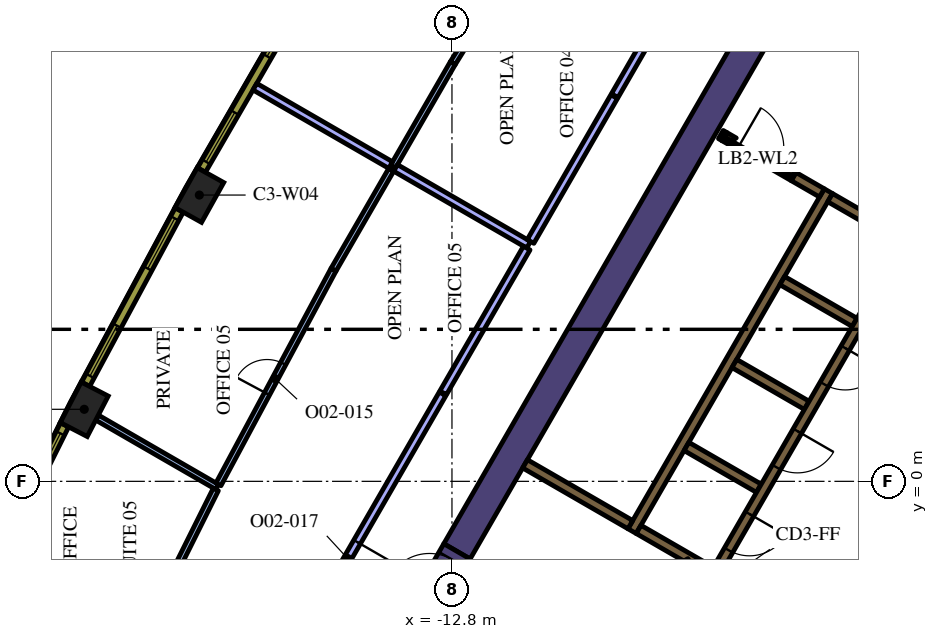
"""IFC4 building model, lengths in metres.
Left out: names, types, materials, properties, quantities, classifications, styles, units other than length and angle.
Written with IfcOpenShell. Run it as: python <this file> out.ifc"""

import sys

from ifc_helpers import new_model, si_unit, direction, frame, frame_2d, origin, origin_2d, place, context, subcontext, project, spatial, polyline, rectangle, outline, extrude, element, fill, save


model = new_model("IFC4")
c1 = context("Model", 3, precision=1e-05, world=origin(), true_north=direction((0.0, 1.0)))
c2 = subcontext(c1, "Body", "Model", "MODEL_VIEW")
j1 = project(units=[si_unit("LENGTHUNIT", "METRE"), si_unit("PLANEANGLEUNIT", "RADIAN")], contexts=[c1])
p1 = place(None, origin())
s1 = spatial("IfcSite", under=j1, at=p1, CompositionType="ELEMENT")
p2 = place(p1, origin())
s2 = spatial("IfcBuilding", under=s1, at=p2, CompositionType="ELEMENT")
p3 = place(p2, frame((0.0, 0.0, 154.2)))
s3 = spatial("IfcBuildingStorey", under=s2, at=p3, CompositionType="ELEMENT", Elevation=154.2)
for number, where, z_axis, x_axis in (
    (1, (-19.447, 7.533, 0.0), (0.0, 0.0, 1.0), (-0.487, -0.874, 0.0)),
    (2, (-22.476, 1.896, 0.0), (0.0, 0.0, 1.0), (-0.46, -0.888, 0.0)),
):
    element("IfcColumn", number, at=place(p3, frame(where, z_axis=z_axis, x_axis=x_axis)), inside=s3, PredefinedType="COLUMN", context=c2, shape_type="SweptSolid", body=[
        extrude(rectangle(XDim=1.2, YDim=0.8, at=origin_2d()), origin(), (0.0, 0.0, 1.0), 4.2),
    ])
p4 = place(p3, frame((-12.668, -1.842, 0.0), z_axis=(0.0, 0.0, 1.0), x_axis=(0.500003640647, 0.866023301845, 0.0)))
e3 = element("IfcWall", 3, at=p4, inside=s3, PredefinedType="SOLIDWALL", context=c2, shape_type="SweptSolid", body=[
    extrude(rectangle(XDim=15.858, YDim=0.8, at=frame_2d((7.929, 0.0))), origin(), (0.0, 0.0, 1.0), 4.2),
])
p5 = place(p3, frame((-8.06, -1.311, 0.0), z_axis=(0.0, 0.0, 1.0), x_axis=(0.50000273126, 0.866023826885, 0.0)))
e4 = element("IfcWall", 4, at=p5, inside=s3, PredefinedType="SOLIDWALL", context=c2, shape_type="SweptSolid", body=[
    extrude(rectangle(XDim=10.33, YDim=0.25, at=frame_2d((5.165, 0.0))), origin(), (0.0, 0.0, 1.0), 4.2),
])
p6 = place(p3, frame((-1.76, 6.836, 0.0), z_axis=(0.0, 0.0, 1.0), x_axis=(-0.865952863304, 0.500125622755, 0.0)))
e5 = element("IfcWall", 5, at=p6, inside=s3, PredefinedType="SOLIDWALL", context=c2, shape_type="SweptSolid", body=[
    extrude(rectangle(XDim=1.258, YDim=0.25, at=frame_2d((0.629, 0.0))), origin(), (0.0, 0.0, 1.0), 4.2),
])
for number, where, z_axis, x_axis in (
    (6, (-2.204, 4.182, 0.0), (0.0, 0.0, 1.0), (-0.866, 0.5, 0.0)),
    (7, (-5.369, 3.1, 0.0), (0.0, 0.0, 1.0), (0.866, -0.5, 0.0)),
    (8, (-4.724, -0.182, 0.0), (0.0, 0.0, 1.0), (-0.866, 0.5, 0.0)),
):
    element("IfcWall", number, at=place(p3, frame(where, z_axis=z_axis, x_axis=x_axis)), inside=s3, PredefinedType="SOLIDWALL", context=c2, shape_type="SweptSolid", body=[
        extrude(rectangle(XDim=2.2, YDim=0.25, at=frame_2d((1.1, 0.0))), origin(), (0.0, 0.0, 1.0), 4.2),
    ])
p7 = place(p3, origin())
e9 = element("IfcWall", 9, at=p7, inside=s3, PredefinedType="SOLIDWALL", context=c2, shape_type="SweptSolid", body=[
    extrude(outline(polyline([(-5.922, -2.257), (-5.922, -2.257), (-5.705, -2.382), (-5.83, -2.598), (-6.483, -2.221), (-6.591, -2.033), (-6.591, -2.033), (-6.7, -2.096), (-7.952, -1.373), (-7.827, -1.156), (-5.922, -2.257)])), origin(), (0.0, 0.0, 1.0), 4.2),
])
p8 = place(p3, frame((-8.106, -1.14, 0.0), z_axis=(0.0, 0.0, 1.0), x_axis=(-0.866008981251, 0.500028443584, 0.0)))
e10 = element("IfcWall", 10, at=p8, inside=s3, PredefinedType="SOLIDWALL", context=c2, shape_type="SweptSolid", body=[
    extrude(rectangle(XDim=3.2, YDim=0.25, at=frame_2d((1.6, 0.0))), origin(), (0.0, 0.0, 1.0), 4.2),
])
p9 = place(p3, frame((-5.725, 9.125, 0.0), z_axis=(0.0, 0.0, 1.0), x_axis=(0.866185586049, -0.49972245349, 0.0)))
e11 = element("IfcWall", 11, at=p9, inside=s3, PredefinedType="SOLIDWALL", context=c2, shape_type="SweptSolid", body=[
    extrude(rectangle(XDim=0.11, YDim=0.25, at=frame_2d((0.055, 0.0))), origin(), (0.0, 0.0, 1.0), 4.2),
])
p10 = place(p3, frame((-3.066, 7.59, 0.0), z_axis=(0.0, 0.0, 1.0), x_axis=(-0.866081358704, 0.49990307071, 0.0)))
e12 = element("IfcWall", 12, at=p10, inside=s3, PredefinedType="SOLIDWALL", context=c2, shape_type="SweptSolid", body=[
    extrude(rectangle(XDim=0.858, YDim=0.25, at=frame_2d((0.429, 0.0))), origin(), (0.0, 0.0, 1.0), 4.2),
])
e13 = element("IfcWall", 13, at=p7, inside=s3, PredefinedType="SOLIDWALL", context=c2, shape_type="SweptSolid", body=[
    extrude(outline(polyline([(-3.748, 8.128), (-3.813, 8.015), (-4.027, 8.139), (-4.017, 8.156), (-4.008, 8.173), (-4.0, 8.192), (-3.995, 8.21), (-3.991, 8.23), (-3.99, 8.25), (-3.99, 8.268), (-3.748, 8.128)])), origin(), (0.0, 0.0, 1.0), 4.2),
])
e14 = element("IfcWall", 14, at=p7, inside=s3, PredefinedType="SOLIDWALL", context=c2, shape_type="SweptSolid", body=[
    extrude(outline(polyline([(-5.689, 8.96), (-5.69, 8.961), (-5.565, 9.177), (-5.319, 9.035), (-5.335, 9.026), (-5.351, 9.015), (-5.366, 9.002), (-5.379, 8.988), (-5.392, 8.972), (-5.402, 8.956), (-5.412, 8.939), (-5.629, 9.064), (-5.629, 9.064), (-5.689, 8.96)])), origin(), (0.0, 0.0, 1.0), 4.2),
])
p11 = place(p3, frame((-0.898, 6.194, 0.0), z_axis=(0.0, 0.0, 1.0), x_axis=(-0.499996202215, -0.866027596426, 0.0)))
e15 = element("IfcWall", 15, at=p11, inside=s3, PredefinedType="SOLIDWALL", context=c2, shape_type="SweptSolid", body=[
    extrude(rectangle(XDim=9.83, YDim=0.25, at=frame_2d((4.915, 0.0))), origin(), (0.0, 0.0, 1.0), 4.2),
])
p12 = place(p11, frame((0.585, 0.0, 0.0)))
e16 = element("IfcOpeningElement", 16, at=p12, cuts=e15, PredefinedType="OPENING", context=c2, shape_type="SweptSolid", body=[
    extrude(rectangle(XDim=1.1, YDim=2.1, at=frame_2d((0.55, 1.05))), frame((0.0, 0.135, 0.0), z_axis=(0.0, -1.0, 0.0), x_axis=(1.0, 0.0, 0.0)), (0.0, 0.0, 1.0), 0.27),
])
p13 = place(p11, frame((3.105, 0.0, 0.0)))
e17 = element("IfcOpeningElement", 17, at=p13, cuts=e15, PredefinedType="OPENING", context=c2, shape_type="SweptSolid", body=[
    extrude(rectangle(XDim=1.1, YDim=2.1, at=frame_2d((0.55, 1.05))), frame((0.0, 0.135, 0.0), z_axis=(0.0, -1.0, 0.0), x_axis=(1.0, 0.0, 0.0)), (0.0, 0.0, 1.0), 0.27),
])
p14 = place(p11, frame((5.625, 0.0, 0.0)))
e18 = element("IfcOpeningElement", 18, at=p14, cuts=e15, PredefinedType="OPENING", context=c2, shape_type="SweptSolid", body=[
    extrude(rectangle(XDim=1.1, YDim=2.1, at=frame_2d((0.55, 1.05))), frame((0.0, 0.135, 0.0), z_axis=(0.0, -1.0, 0.0), x_axis=(1.0, 0.0, 0.0)), (0.0, 0.0, 1.0), 0.27),
])
p15 = place(p11, frame((8.145, 0.0, 0.0)))
e19 = element("IfcOpeningElement", 19, at=p15, cuts=e15, PredefinedType="OPENING", context=c2, shape_type="SweptSolid", body=[
    extrude(rectangle(XDim=1.1, YDim=2.1, at=frame_2d((0.55, 1.05))), frame((0.0, 0.135, 0.0), z_axis=(0.0, -1.0, 0.0), x_axis=(1.0, 0.0, 0.0)), (0.0, 0.0, 1.0), 0.27),
])
p16 = place(p3, frame((-5.659, 9.012, 0.0), z_axis=(0.0, 0.0, 1.0), x_axis=(0.866009402589, -0.500027713859, 0.0)))
e20 = element("IfcWall", 20, at=p16, inside=s3, PredefinedType="PARTITIONING", context=c2, shape_type="SweptSolid", body=[
    extrude(rectangle(XDim=2.1, YDim=0.12, at=frame_2d((1.05, 0.0))), origin(), (0.0, 0.0, 1.0), 3.15),
])
p17 = place(p16, frame((0.45, 0.0, 0.0)))
e21 = element("IfcOpeningElement", 21, at=p17, cuts=e20, PredefinedType="OPENING", context=c2, shape_type="SweptSolid", body=[
    extrude(rectangle(XDim=1.2, YDim=2.1, at=frame_2d((0.6, 1.05))), frame((0.0, 0.07, 0.0), z_axis=(0.0, -1.0, 0.0), x_axis=(1.0, 0.0, 0.0)), (0.0, 0.0, 1.0), 0.14),
])
p18 = place(p3, frame((-13.518, -3.314, 0.0), z_axis=(0.0, 0.0, 1.0), x_axis=(0.500062241894, 0.865989465428, 0.0)))
e22 = element("IfcWall", 22, at=p18, inside=s3, PredefinedType="SOLIDWALL", context=c2, shape_type="SweptSolid", body=[
    extrude(rectangle(XDim=1.7, YDim=0.8, at=frame_2d((0.85, 0.0))), origin(), (0.0, 0.0, 1.0), 4.2),
])
p19 = place(p18, frame((0.25, 0.0, 0.0)))
e23 = element("IfcOpeningElement", 23, at=p19, cuts=e22, PredefinedType="OPENING", context=c2, shape_type="SweptSolid", body=[
    extrude(rectangle(XDim=1.2, YDim=2.1, at=frame_2d((0.6, 1.05))), frame((0.0, 0.41, 0.0), z_axis=(0.0, -1.0, 0.0), x_axis=(1.0, 0.0, 0.0)), (0.0, 0.0, 1.0), 0.82),
])
p20 = place(p3, frame((-12.779, 11.002, 0.0), z_axis=(0.0, 0.0, 1.0), x_axis=(0.527026092571, 0.849849102929, 0.0)))
e24 = element("IfcWall", 24, at=p20, inside=s3, PredefinedType="PARTITIONING", context=c2, shape_type="SweptSolid", body=[
    extrude(rectangle(XDim=6.407, YDim=0.15, at=frame_2d((3.204, 0.0))), origin(), (0.0, 0.0, 1.0), 3.15),
])
p21 = place(p20, frame((2.707, 0.0, 0.0)))
e25 = element("IfcOpeningElement", 25, at=p21, cuts=e24, PredefinedType="OPENING", context=c2, shape_type="SweptSolid", body=[
    extrude(rectangle(XDim=0.9, YDim=2.1, at=frame_2d((0.45, 1.05))), frame((0.0, 0.085, 0.0), z_axis=(0.0, -1.0, 0.0), x_axis=(1.0, 0.0, 0.0)), (0.0, 0.0, 1.0), 0.17),
])
p22 = place(p3, frame((-12.779, 11.002, 0.0), z_axis=(0.0, 0.0, 1.0), x_axis=(-0.499996312652, -0.866027532665, 0.0)))
e26 = element("IfcWall", 26, at=p22, inside=s3, PredefinedType="PARTITIONING", context=c2, shape_type="SweptSolid", body=[
    extrude(rectangle(XDim=3.138, YDim=0.15, at=frame_2d((1.569, 0.0))), origin(), (0.0, 0.0, 1.0), 3.15),
])
p23 = place(p3, frame((-14.413, 8.322, 0.0), z_axis=(0.0, 0.0, 1.0), x_axis=(-0.866034795751, 0.499983732284, 0.0)))
e27 = element("IfcWall", 27, at=p23, inside=s3, PredefinedType="PARTITIONING", context=c2, shape_type="SweptSolid", body=[
    extrude(rectangle(XDim=4.125, YDim=0.2, at=frame_2d((2.062, 0.0))), origin(), (0.0, 0.0, 1.0), 3.15),
])
p24 = place(p3, frame((-10.782, 6.225, 0.0), z_axis=(0.0, 0.0, 1.0), x_axis=(-0.866034752867, 0.499983806564, 0.0)))
e28 = element("IfcWall", 28, at=p24, inside=s3, PredefinedType="PARTITIONING", context=c2, shape_type="SweptSolid", body=[
    extrude(rectangle(XDim=4.043, YDim=0.2, at=frame_2d((2.021, 0.0))), origin(), (0.0, 0.0, 1.0), 3.15),
])
p25 = place(p3, frame((-8.532, 10.122, 0.0), z_axis=(0.0, 0.0, 1.0), x_axis=(-0.499988222896, -0.866032203192, 0.0)))
e29 = element("IfcWall", 29, at=p25, inside=s3, PredefinedType="PARTITIONING", context=c2, shape_type="SweptSolid", body=[
    extrude(rectangle(XDim=4.4, YDim=0.2, at=frame_2d((2.2, 0.0))), origin(), (0.0, 0.0, 1.0), 3.15),
])
p26 = place(p3, frame((-3.522, 18.8, 0.0), z_axis=(0.0, 0.0, 1.0), x_axis=(-0.500015783377, -0.866016291056, 0.0)))
e30 = element("IfcWall", 30, at=p26, inside=s3, PredefinedType="PARTITIONING", context=c2, shape_type="SweptSolid", body=[
    extrude(rectangle(XDim=9.99, YDim=0.2, at=frame_2d((4.995, 0.0))), origin(), (0.0, 0.0, 1.0), 3.15),
])
p27 = place(p26, frame((4.5, 0.0, 0.0)))
e31 = element("IfcOpeningElement", 31, at=p27, cuts=e30, PredefinedType="OPENING", context=c2, shape_type="SweptSolid", body=[
    extrude(rectangle(XDim=1.0, YDim=2.1, at=frame_2d((0.5, 1.05))), frame((0.0, 0.11, 0.0), z_axis=(0.0, -1.0, 0.0), x_axis=(1.0, 0.0, 0.0)), (0.0, 0.0, 1.0), 0.22),
])
p28 = place(p3, frame((-18.98, -0.147, 0.0), z_axis=(0.0, 0.0, 1.0), x_axis=(-0.866035116605, 0.499983176524, 0.0)))
e32 = element("IfcWall", 32, at=p28, inside=s3, PredefinedType="PARTITIONING", context=c2, shape_type="SweptSolid", body=[
    extrude(rectangle(XDim=3.648, YDim=0.15, at=frame_2d((1.824, 0.0))), origin(), (0.0, 0.0, 1.0), 3.15),
])
p29 = place(p3, frame((-14.398, 8.198, 0.0), z_axis=(0.0, 0.0, 1.0), x_axis=(-0.499993740961, -0.866029017412, 0.0)))
e33 = element("IfcWall", 33, at=p29, inside=s3, PredefinedType="PARTITIONING", context=c2, shape_type="SweptSolid", body=[
    extrude(rectangle(XDim=3.038, YDim=0.15, at=frame_2d((1.519, 0.0))), origin(), (0.0, 0.0, 1.0), 3.15),
])
p30 = place(p3, frame((-18.945, -0.081, 0.0), z_axis=(0.0, 0.0, 1.0), x_axis=(0.472485737981, 0.881338316088, 0.0)))
e34 = element("IfcWall", 34, at=p30, inside=s3, PredefinedType="PARTITIONING", context=c2, shape_type="SweptSolid", body=[
    extrude(rectangle(XDim=6.407, YDim=0.15, at=frame_2d((3.204, 0.0))), origin(), (0.0, 0.0, 1.0), 3.15),
])
p31 = place(p30, frame((2.707, 0.0, 0.0)))
e35 = element("IfcOpeningElement", 35, at=p31, cuts=e34, PredefinedType="OPENING", context=c2, shape_type="SweptSolid", body=[
    extrude(rectangle(XDim=0.9, YDim=2.1, at=frame_2d((0.45, 1.05))), frame((0.0, 0.085, 0.0), z_axis=(0.0, -1.0, 0.0), x_axis=(1.0, 0.0, 0.0)), (0.0, 0.0, 1.0), 0.17),
])
p32 = place(p3, frame((-21.689, -5.579, 0.0), z_axis=(0.0, 0.0, 1.0), x_axis=(0.446219729364, 0.894923434225, 0.0)))
e36 = element("IfcWall", 36, at=p32, inside=s3, PredefinedType="PARTITIONING", context=c2, shape_type="SweptSolid", body=[
    extrude(rectangle(XDim=5.995, YDim=0.15, at=frame_2d((2.998, 0.0))), origin(), (0.0, 0.0, 1.0), 3.15),
])
p33 = place(p32, frame((2.595, 0.0, 0.0)))
e37 = element("IfcOpeningElement", 37, at=p33, cuts=e36, PredefinedType="OPENING", context=c2, shape_type="SweptSolid", body=[
    extrude(rectangle(XDim=0.9, YDim=2.1, at=frame_2d((0.45, 1.05))), frame((0.0, 0.085, 0.0), z_axis=(0.0, -1.0, 0.0), x_axis=(1.0, 0.0, 0.0)), (0.0, 0.0, 1.0), 0.17),
])
p34 = place(p3, frame((-10.832, 6.138, 0.0), z_axis=(0.0, 0.0, 1.0), x_axis=(-0.499988222896, -0.866032203192, 0.0)))
e38 = element("IfcWall", 38, at=p34, inside=s3, PredefinedType="PARTITIONING", context=c2, shape_type="SweptSolid", body=[
    extrude(rectangle(XDim=4.4, YDim=0.2, at=frame_2d((2.2, 0.0))), origin(), (0.0, 0.0, 1.0), 3.15),
])
p35 = place(p3, frame((-13.047, 2.302, 0.0), z_axis=(0.0, 0.0, 1.0), x_axis=(-0.499986873641, -0.866032982159, 0.0)))
e39 = element("IfcWall", 39, at=p35, inside=s3, PredefinedType="PARTITIONING", context=c2, shape_type="SweptSolid", body=[
    extrude(rectangle(XDim=9.99, YDim=0.2, at=frame_2d((4.995, 0.0))), origin(), (0.0, 0.0, 1.0), 3.15),
])
p36 = place(p35, frame((4.5, 0.0, 0.0)))
e40 = element("IfcOpeningElement", 40, at=p36, cuts=e39, PredefinedType="OPENING", context=c2, shape_type="SweptSolid", body=[
    extrude(rectangle(XDim=1.0, YDim=2.1, at=frame_2d((0.5, 1.05))), frame((0.0, 0.11, 0.0), z_axis=(0.0, -1.0, 0.0), x_axis=(1.0, 0.0, 0.0)), (0.0, 0.0, 1.0), 0.22),
])
p37 = place(p3, frame((-16.789, 12.697, 0.0), z_axis=(0.0, 0.0, 1.0), x_axis=(-0.500009456303, -0.866019944116, 0.0)))
e41 = element("IfcWall", 41, at=p37, inside=s3, PredefinedType="SOLIDWALL", context=c2, shape_type="SweptSolid", body=[
    extrude(rectangle(XDim=5.204, YDim=0.24, at=frame_2d((2.602, 0.0))), origin(), (0.0, 0.0, 1.0), 3.95),
])
p38 = place(p37, frame((0.248, 0.0, 0.9)))
e42 = element("IfcOpeningElement", 42, at=p38, cuts=e41, PredefinedType="OPENING", context=c2, shape_type="SweptSolid", body=[
    extrude(rectangle(XDim=1.5, YDim=2.55, at=frame_2d((0.75, 1.275))), frame((0.0, 0.13, 0.0), z_axis=(0.0, -1.0, 0.0), x_axis=(1.0, 0.0, 0.0)), (0.0, 0.0, 1.0), 0.26),
])
p39 = place(p37, frame((3.455, 0.0, 0.9)))
e43 = element("IfcOpeningElement", 43, at=p39, cuts=e41, PredefinedType="OPENING", context=c2, shape_type="SweptSolid", body=[
    extrude(rectangle(XDim=1.5, YDim=2.55, at=frame_2d((0.75, 1.275))), frame((0.0, 0.13, 0.0), z_axis=(0.0, -1.0, 0.0), x_axis=(1.0, 0.0, 0.0)), (0.0, 0.0, 1.0), 0.26),
])
p40 = place(p3, frame((-19.977, 7.139, 0.0), z_axis=(0.0, 0.0, 1.0), x_axis=(-0.473349833294, -0.880874528704, 0.0)))
e44 = element("IfcWall", 44, at=p40, inside=s3, PredefinedType="SOLIDWALL", context=c2, shape_type="SweptSolid", body=[
    extrude(rectangle(XDim=5.204, YDim=0.24, at=frame_2d((2.602, 0.0))), origin(), (0.0, 0.0, 1.0), 3.95),
])
p41 = place(p40, frame((0.248, 0.0, 0.9)))
e45 = element("IfcOpeningElement", 45, at=p41, cuts=e44, PredefinedType="OPENING", context=c2, shape_type="SweptSolid", body=[
    extrude(rectangle(XDim=1.5, YDim=2.55, at=frame_2d((0.75, 1.275))), frame((0.0, 0.13, 0.0), z_axis=(0.0, -1.0, 0.0), x_axis=(1.0, 0.0, 0.0)), (0.0, 0.0, 1.0), 0.26),
])
p42 = place(p40, frame((3.455, 0.0, 0.9)))
e46 = element("IfcOpeningElement", 46, at=p42, cuts=e44, PredefinedType="OPENING", context=c2, shape_type="SweptSolid", body=[
    extrude(rectangle(XDim=1.5, YDim=2.55, at=frame_2d((0.75, 1.275))), frame((0.0, 0.13, 0.0), z_axis=(0.0, -1.0, 0.0), x_axis=(1.0, 0.0, 0.0)), (0.0, 0.0, 1.0), 0.26),
])
p43 = place(p3, frame((-22.994, 1.485, 0.0), z_axis=(0.0, 0.0, 1.0), x_axis=(-0.446256171312, -0.8949052629, 0.0)))
e47 = element("IfcWall", 47, at=p43, inside=s3, PredefinedType="SOLIDWALL", context=c2, shape_type="SweptSolid", body=[
    extrude(rectangle(XDim=5.203, YDim=0.24, at=frame_2d((2.602, 0.0))), origin(), (0.0, 0.0, 1.0), 3.95),
])
p44 = place(p43, frame((0.248, 0.0, 0.9)))
e48 = element("IfcOpeningElement", 48, at=p44, cuts=e47, PredefinedType="OPENING", context=c2, shape_type="SweptSolid", body=[
    extrude(rectangle(XDim=1.5, YDim=2.55, at=frame_2d((0.75, 1.275))), frame((0.0, 0.13, 0.0), z_axis=(0.0, -1.0, 0.0), x_axis=(1.0, 0.0, 0.0)), (0.0, 0.0, 1.0), 0.26),
])
p45 = place(p43, frame((3.455, 0.0, 0.9)))
e49 = element("IfcOpeningElement", 49, at=p45, cuts=e47, PredefinedType="OPENING", context=c2, shape_type="SweptSolid", body=[
    extrude(rectangle(XDim=1.5, YDim=2.55, at=frame_2d((0.75, 1.275))), frame((0.0, 0.13, 0.0), z_axis=(0.0, -1.0, 0.0), x_axis=(1.0, 0.0, 0.0)), (0.0, 0.0, 1.0), 0.26),
])
p46 = place(p13, origin())
e50 = element("IfcDoor", 50, at=p46, inside=s3, OperationType="DOUBLE_DOOR_SLIDING", PredefinedType="DOOR", context=c2, shape_type="SweptSolid", body=[
    extrude(rectangle(XDim=1.1, YDim=2.1, at=frame_2d((0.55, 1.05))), frame((0.0, 0.025, 0.0), z_axis=(0.0, -1.0, 0.0), x_axis=(1.0, 0.0, 0.0)), (0.0, 0.0, 1.0), 0.05),
])
fill(e17, e50)
p47 = place(p14, origin())
e51 = element("IfcDoor", 51, at=p47, inside=s3, OperationType="DOUBLE_DOOR_SLIDING", PredefinedType="DOOR", context=c2, shape_type="SweptSolid", body=[
    extrude(rectangle(XDim=1.1, YDim=2.1, at=frame_2d((0.55, 1.05))), frame((0.0, 0.025, 0.0), z_axis=(0.0, -1.0, 0.0), x_axis=(1.0, 0.0, 0.0)), (0.0, 0.0, 1.0), 0.05),
])
fill(e18, e51)
p48 = place(p15, origin())
e52 = element("IfcDoor", 52, at=p48, inside=s3, OperationType="DOUBLE_DOOR_SLIDING", PredefinedType="DOOR", context=c2, shape_type="SweptSolid", body=[
    extrude(rectangle(XDim=1.1, YDim=2.1, at=frame_2d((0.55, 1.05))), frame((0.0, 0.025, 0.0), z_axis=(0.0, -1.0, 0.0), x_axis=(1.0, 0.0, 0.0)), (0.0, 0.0, 1.0), 0.05),
])
fill(e19, e52)
p49 = place(p17, origin())
e53 = element("IfcDoor", 53, at=p49, inside=s3, OperationType="SINGLE_SWING_LEFT", PredefinedType="DOOR", context=c2, shape_type="SweptSolid", body=[
    extrude(rectangle(XDim=1.2, YDim=2.1, at=frame_2d((0.6, 1.05))), frame((0.0, 0.025, 0.0), z_axis=(0.0, -1.0, 0.0), x_axis=(1.0, 0.0, 0.0)), (0.0, 0.0, 1.0), 0.05),
])
fill(e21, e53)
p50 = place(p31, origin())
e54 = element("IfcDoor", 54, at=p50, inside=s3, OperationType="SINGLE_SWING_LEFT", PredefinedType="DOOR", context=c2, shape_type="SweptSolid", body=[
    extrude(rectangle(XDim=0.9, YDim=2.1, at=frame_2d((0.45, 1.05))), frame((0.0, 0.025, 0.0), z_axis=(0.0, -1.0, 0.0), x_axis=(1.0, 0.0, 0.0)), (0.0, 0.0, 1.0), 0.05),
])
fill(e35, e54)
p51 = place(p36, origin())
e55 = element("IfcDoor", 55, at=p51, inside=s3, OperationType="SINGLE_SWING_RIGHT", PredefinedType="DOOR", context=c2, shape_type="SweptSolid", body=[
    extrude(rectangle(XDim=1.0, YDim=2.1, at=frame_2d((0.5, 1.05))), frame((0.0, 0.025, 0.0), z_axis=(0.0, -1.0, 0.0), x_axis=(1.0, 0.0, 0.0)), (0.0, 0.0, 1.0), 0.05),
])
fill(e40, e55)
p52 = place(p38, origin())
e56 = element("IfcWindow", 56, at=p52, inside=s3, PartitioningType="SINGLE_PANEL", PredefinedType="WINDOW", context=c2, shape_type="SweptSolid", body=[
    extrude(rectangle(XDim=1.5, YDim=2.55, at=frame_2d((0.75, 1.275))), frame((0.0, 0.04, 0.0), z_axis=(0.0, -1.0, 0.0), x_axis=(1.0, 0.0, 0.0)), (0.0, 0.0, 1.0), 0.06),
])
fill(e42, e56)
p53 = place(p39, origin())
e57 = element("IfcWindow", 57, at=p53, inside=s3, PartitioningType="SINGLE_PANEL", PredefinedType="WINDOW", context=c2, shape_type="SweptSolid", body=[
    extrude(rectangle(XDim=1.5, YDim=2.55, at=frame_2d((0.75, 1.275))), frame((0.0, 0.04, 0.0), z_axis=(0.0, -1.0, 0.0), x_axis=(1.0, 0.0, 0.0)), (0.0, 0.0, 1.0), 0.06),
])
fill(e43, e57)
p54 = place(p41, origin())
e58 = element("IfcWindow", 58, at=p54, inside=s3, PartitioningType="SINGLE_PANEL", PredefinedType="WINDOW", context=c2, shape_type="SweptSolid", body=[
    extrude(rectangle(XDim=1.5, YDim=2.55, at=frame_2d((0.75, 1.275))), frame((0.0, 0.04, 0.0), z_axis=(0.0, -1.0, 0.0), x_axis=(1.0, 0.0, 0.0)), (0.0, 0.0, 1.0), 0.06),
])
fill(e45, e58)
p55 = place(p42, origin())
e59 = element("IfcWindow", 59, at=p55, inside=s3, PartitioningType="SINGLE_PANEL", PredefinedType="WINDOW", context=c2, shape_type="SweptSolid", body=[
    extrude(rectangle(XDim=1.5, YDim=2.55, at=frame_2d((0.75, 1.275))), frame((0.0, 0.04, 0.0), z_axis=(0.0, -1.0, 0.0), x_axis=(1.0, 0.0, 0.0)), (0.0, 0.0, 1.0), 0.06),
])
fill(e46, e59)
p56 = place(p44, origin())
e60 = element("IfcWindow", 60, at=p56, inside=s3, PartitioningType="SINGLE_PANEL", PredefinedType="WINDOW", context=c2, shape_type="SweptSolid", body=[
    extrude(rectangle(XDim=1.5, YDim=2.55, at=frame_2d((0.75, 1.275))), frame((0.0, 0.04, 0.0), z_axis=(0.0, -1.0, 0.0), x_axis=(1.0, 0.0, 0.0)), (0.0, 0.0, 1.0), 0.06),
])
fill(e48, e60)
save(model, sys.argv[1])
